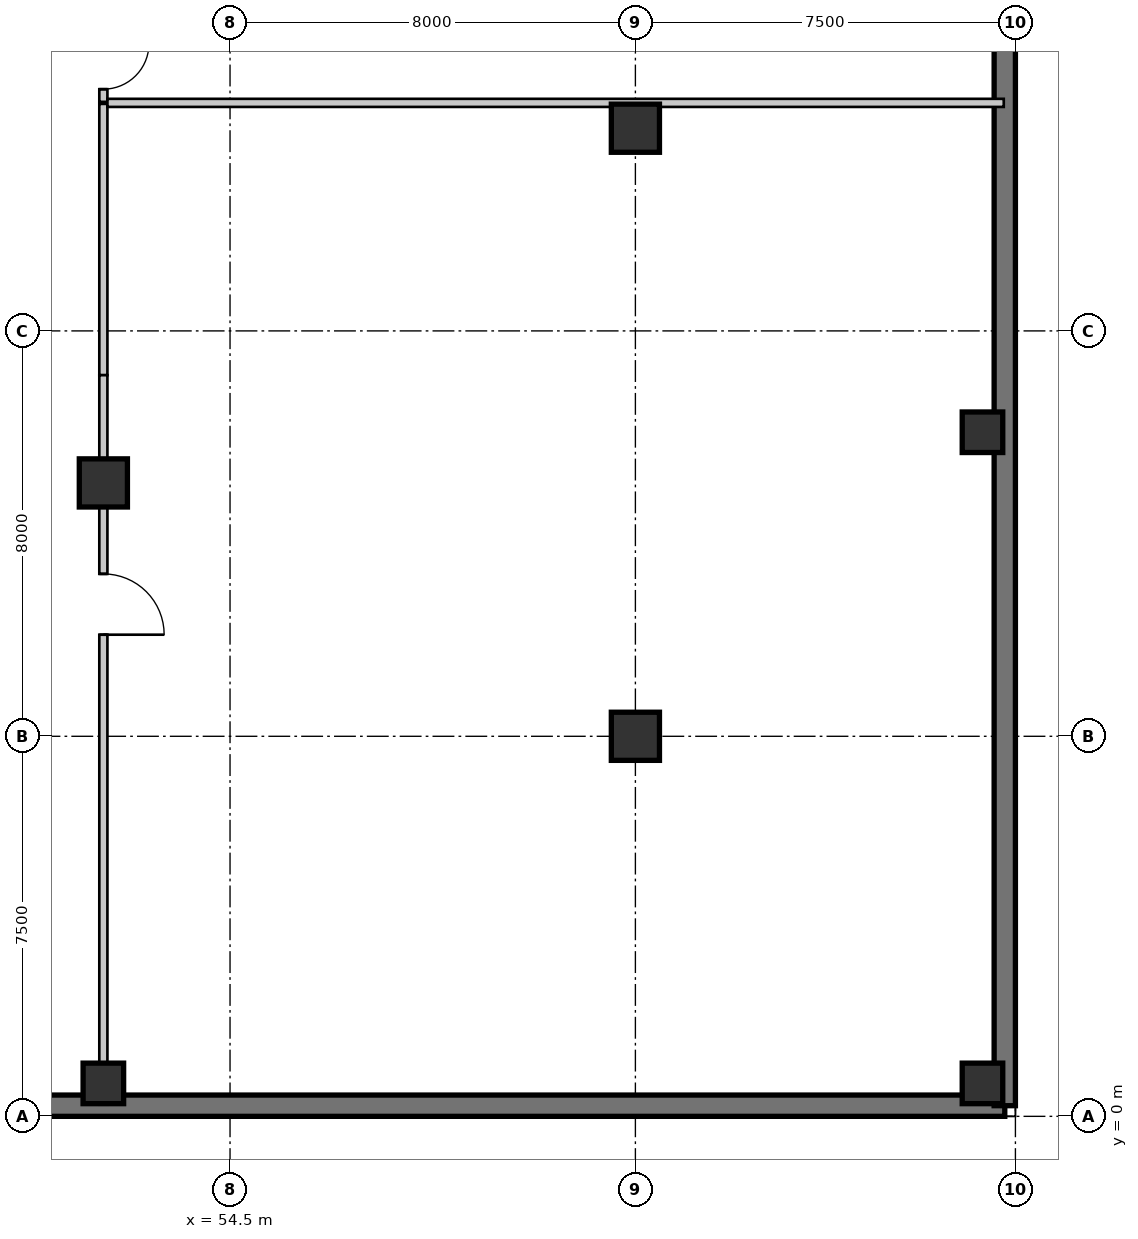
"""IFC4 building model, lengths in metres.
Left out: names, types, materials, properties, quantities, classifications, styles, units other than length and angle.
Written with IfcOpenShell. Run it as: python <this file> out.ifc"""

import sys

from ifc_helpers import new_model, si_unit, direction, frame, frame_2d, origin, origin_2d, place, context, subcontext, project, spatial, rectangle, extrude, source, transform, mapped, element, fill, save


model = new_model("IFC4")
c1 = context("Model", 3, precision=1e-05, world=origin(), true_north=direction((0.0, 1.0)))
c2 = subcontext(c1, "Body", "Model", "MODEL_VIEW")
j1 = project(units=[si_unit("LENGTHUNIT", "METRE"), si_unit("PLANEANGLEUNIT", "RADIAN")], contexts=[c1])
p1 = place(None, origin())
s1 = spatial("IfcSite", under=j1, at=p1, CompositionType="ELEMENT")
p2 = place(p1, origin())
s2 = spatial("IfcBuilding", under=s1, at=p2, CompositionType="ELEMENT")
p3 = place(p2, frame((0.0, 0.0, -4.0)))
s3 = spatial("IfcBuildingStorey", under=s2, at=p3, CompositionType="ELEMENT", Elevation=-4.0)
m1 = source(origin(), c2, "Body", "SweptSolid", [
    extrude(rectangle(XDim=0.95, YDim=0.95, at=origin_2d()), origin(), (0.0, 0.0, 1.0), 4.0),
])
for number, where, z_axis, x_axis in (
    (1, (52.0, 12.5, 0.0), (0.0, 0.0, 1.0), (1.0, 0.0, 0.0)),
    (2, (62.5, 7.5, 0.0), (0.0, 0.0, 1.0), (1.0, 0.0, 0.0)),
    (3, (62.5, 19.5, 0.0), (0.0, 0.0, 1.0), (1.0, 0.0, 0.0)),
):
    element("IfcColumn", number, at=place(p3, frame(where, z_axis=z_axis, x_axis=x_axis)), inside=s3, PredefinedType="COLUMN", context=c2, shape_type="MappedRepresentation", body=[
        mapped(m1, transform((0.0, 0.0, 0.0), scale=1.0)),
    ])
m2 = source(origin(), c2, "Body", "SweptSolid", [
    extrude(rectangle(XDim=0.8, YDim=0.8, at=origin_2d()), origin(), (0.0, 0.0, 1.0), 4.0),
])
for number, where, z_axis, x_axis in (
    (4, (69.35, 0.65, 0.0), (0.0, 0.0, 1.0), (1.0, 0.0, 0.0)),
    (5, (69.35, 13.5, 0.0), (0.0, 0.0, 1.0), (1.0, 0.0, 0.0)),
    (6, (52.0, 0.65, 0.0), (0.0, 0.0, 1.0), (1.0, 0.0, 0.0)),
):
    element("IfcColumn", number, at=place(p3, frame(where, z_axis=z_axis, x_axis=x_axis)), inside=s3, PredefinedType="COLUMN", context=c2, shape_type="MappedRepresentation", body=[
        mapped(m2, transform((0.0, 0.0, 0.0), scale=1.0)),
    ])
m3 = source(origin(), c2, "Body", "SweptSolid", [
    extrude(rectangle(XDim=69.58, YDim=0.42, at=frame_2d((34.79, 0.0))), origin(), (0.0, 0.0, 1.0), 3.74),
])
p4 = place(p3, frame((0.21, 0.21, 0.0), z_axis=(0.0, 0.0, 1.0), x_axis=(1.0, 0.0, 0.0)))
e7 = element("IfcWall", 7, at=p4, inside=s3, PredefinedType="SOLIDWALL", context=c2, shape_type="MappedRepresentation", body=[
    mapped(m3, transform((0.0, 0.0, 0.0), scale=1.0)),
])
m4 = source(origin(), c2, "Body", "SweptSolid", [
    extrude(rectangle(XDim=39.58, YDim=0.42, at=frame_2d((19.79, 0.0))), origin(), (0.0, 0.0, 1.0), 3.74),
])
p5 = place(p3, frame((69.79, 0.21, 0.0), z_axis=(0.0, 0.0, 1.0), x_axis=(0.0, 1.0, 0.0)))
e8 = element("IfcWall", 8, at=p5, inside=s3, PredefinedType="SOLIDWALL", context=c2, shape_type="MappedRepresentation", body=[
    mapped(m4, transform((0.0, 0.0, 0.0), scale=1.0)),
])
m5 = source(origin(), c2, "Body", "SweptSolid", [
    extrude(rectangle(XDim=5.354, YDim=0.16, at=frame_2d((2.677, 0.0))), origin(), (0.0, 0.0, 1.0), 3.74),
])
p6 = place(p3, frame((52.0, 19.98, 0.0), z_axis=(0.0, 0.0, 1.0), x_axis=(0.0, -1.0, 0.0)))
e9 = element("IfcWall", 9, at=p6, inside=s3, PredefinedType="PARTITIONING", context=c2, shape_type="MappedRepresentation", body=[
    mapped(m5, transform((0.0, 0.0, 0.0), scale=1.0)),
])
m6 = source(origin(), c2, "Body", "SweptSolid", [
    extrude(rectangle(XDim=13.976, YDim=0.16, at=frame_2d((6.988, 0.0))), origin(), (0.0, 0.0, 1.0), 3.207),
])
p7 = place(p3, frame((52.0, 14.626, 0.0), z_axis=(0.0, 0.0, 1.0), x_axis=(0.0, -1.0, 0.0)))
e10 = element("IfcWall", 10, at=p7, inside=s3, PredefinedType="PARTITIONING", context=c2, shape_type="MappedRepresentation", body=[
    mapped(m6, transform((0.0, 0.0, 0.0), scale=1.0)),
])
m7 = source(origin(), c2, "Body", "SweptSolid", [
    extrude(rectangle(XDim=1.2, YDim=2.1, at=frame_2d((0.6, 1.05))), frame((0.0, 0.09, 0.0), z_axis=(0.0, -1.0, 0.0), x_axis=(1.0, 0.0, 0.0)), (0.0, 0.0, 1.0), 0.18),
])
p8 = place(p7, frame((3.921, 0.0, 0.0)))
e11 = element("IfcOpeningElement", 11, at=p8, cuts=e10, PredefinedType="OPENING", context=c2, shape_type="MappedRepresentation", body=[
    mapped(m7, transform((0.0, 0.0, 0.0), scale=1.0)),
])
m8 = source(origin(), c2, "Body", "SweptSolid", [
    extrude(rectangle(XDim=0.42, YDim=0.16, at=frame_2d((0.21, 0.0))), origin(), (0.0, 0.0, 1.0), 3.74),
])
p9 = place(p3, frame((52.0, 0.65, 0.0), z_axis=(0.0, 0.0, 1.0), x_axis=(0.0, -1.0, 0.0)))
e12 = element("IfcWall", 12, at=p9, inside=s3, PredefinedType="PARTITIONING", context=c2, shape_type="MappedRepresentation", body=[
    mapped(m8, transform((0.0, 0.0, 0.0), scale=1.0)),
])
m9 = source(origin(), c2, "Body", "SweptSolid", [
    extrude(rectangle(XDim=1.4, YDim=0.16, at=frame_2d((0.7, 0.0))), origin(), (0.0, 0.0, 1.0), 3.74),
])
p10 = place(p3, frame((52.0, 21.42, 0.0), z_axis=(0.0, 0.0, 1.0), x_axis=(0.0, -1.0, 0.0)))
e13 = element("IfcWall", 13, at=p10, inside=s3, PredefinedType="PARTITIONING", context=c2, shape_type="MappedRepresentation", body=[
    mapped(m9, transform((0.0, 0.0, 0.0), scale=1.0)),
])
m10 = source(origin(), c2, "Body", "SweptSolid", [
    extrude(rectangle(XDim=0.9, YDim=2.1, at=frame_2d((0.45, 1.05))), frame((0.0, 0.09, 0.0), z_axis=(0.0, -1.0, 0.0), x_axis=(1.0, 0.0, 0.0)), (0.0, 0.0, 1.0), 0.18),
])
p11 = place(p10, frame((0.25, 0.0, 0.0)))
e14 = element("IfcOpeningElement", 14, at=p11, cuts=e13, PredefinedType="OPENING", context=c2, shape_type="MappedRepresentation", body=[
    mapped(m10, transform((0.0, 0.0, 0.0), scale=1.0)),
])
m11 = source(origin(), c2, "Body", "SweptSolid", [
    extrude(rectangle(XDim=17.69, YDim=0.16, at=frame_2d((8.845, 0.0))), origin(), (0.0, 0.0, 1.0), 3.74),
])
p12 = place(p3, frame((52.08, 20.0, 0.0), z_axis=(0.0, 0.0, 1.0), x_axis=(1.0, 0.0, 0.0)))
e15 = element("IfcWall", 15, at=p12, inside=s3, PredefinedType="PARTITIONING", context=c2, shape_type="MappedRepresentation", body=[
    mapped(m11, transform((0.0, 0.0, 0.0), scale=1.0)),
])
m12 = source(origin(), c2, "Body", "SweptSolid", [
    extrude(rectangle(XDim=1.2, YDim=2.1, at=frame_2d((0.6, 1.05))), frame((0.0, 0.025, 0.0), z_axis=(0.0, -1.0, 0.0), x_axis=(1.0, 0.0, 0.0)), (0.0, 0.0, 1.0), 0.05),
])
p13 = place(p8, origin())
e16 = element("IfcDoor", 16, at=p13, inside=s3, OperationType="SINGLE_SWING_RIGHT", PredefinedType="GATE", context=c2, shape_type="MappedRepresentation", body=[
    mapped(m12, transform((0.0, 0.0, 0.0), scale=1.0)),
])
fill(e11, e16)
m13 = source(origin(), c2, "Body", "SweptSolid", [
    extrude(rectangle(XDim=0.9, YDim=2.1, at=frame_2d((0.45, 1.05))), frame((0.0, 0.025, 0.0), z_axis=(0.0, -1.0, 0.0), x_axis=(1.0, 0.0, 0.0)), (0.0, 0.0, 1.0), 0.05),
])
p14 = place(p11, origin())
e17 = element("IfcDoor", 17, at=p14, inside=s3, OperationType="SINGLE_SWING_LEFT", PredefinedType="GATE", context=c2, shape_type="MappedRepresentation", body=[
    mapped(m13, transform((0.0, 0.0, 0.0), scale=1.0)),
])
fill(e14, e17)
save(model, sys.argv[1])
